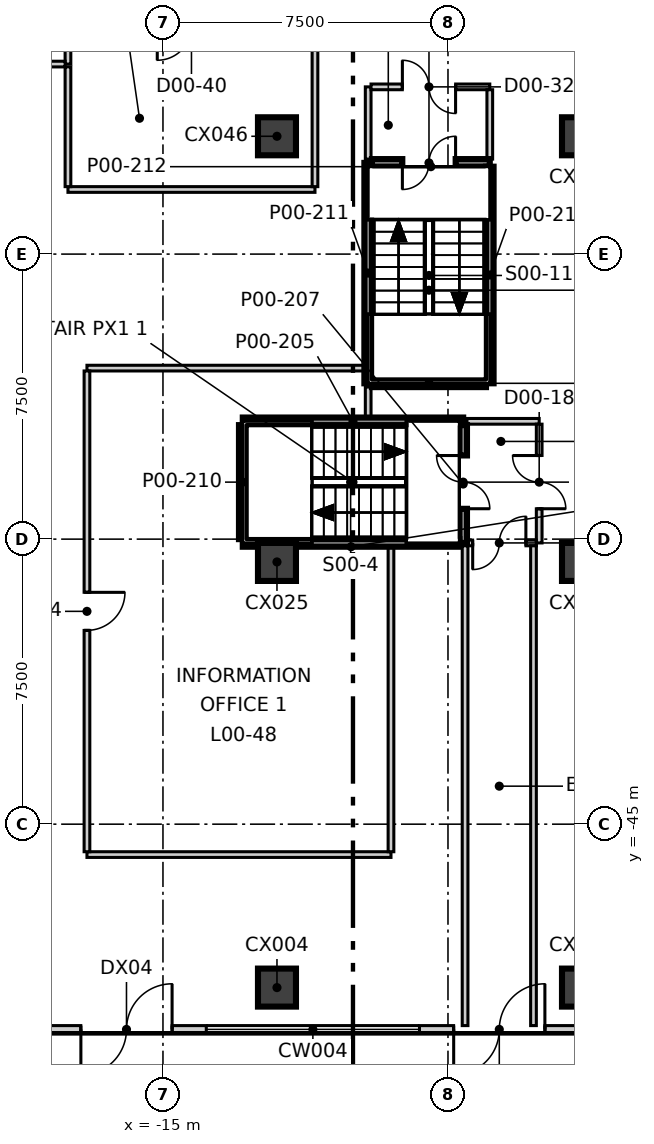
"""IFC4 building model, lengths in metres.
Left out: names, types, materials, properties, quantities, classifications, styles, units other than length and angle.
Written with IfcOpenShell. Run it as: python <this file> out.ifc"""

import sys

from ifc_helpers import new_model, si_unit, direction, frame, frame_2d, origin, origin_2d, place, context, subcontext, project, spatial, rectangle, extrude, element, fill, save


model = new_model("IFC4")
c1 = context("Model", 3, precision=1e-05, world=origin(), true_north=direction((0.0, 1.0)))
c2 = subcontext(c1, "Body", "Model", "MODEL_VIEW")
j1 = project(units=[si_unit("LENGTHUNIT", "METRE"), si_unit("PLANEANGLEUNIT", "RADIAN")], contexts=[c1])
p1 = place(None, origin())
s1 = spatial("IfcSite", under=j1, at=p1, CompositionType="ELEMENT")
p2 = place(p1, origin())
s2 = spatial("IfcBuilding", under=s1, at=p2, CompositionType="ELEMENT")
p3 = place(p2, origin())
s3 = spatial("IfcBuildingStorey", under=s2, at=p3, CompositionType="ELEMENT", Elevation=0.0)
for number, where, z_axis, x_axis in (
    (1, (-12.0, -49.3, -0.4), (0.0, 0.0, 1.0), (1.0, 0.0, 0.0)),
    (2, (-4.0, -49.3, -0.4), (0.0, 0.0, 1.0), (1.0, 0.0, 0.0)),
    (3, (-12.0, -38.1, -0.4), (0.0, 0.0, 1.0), (1.0, 0.0, 0.0)),
    (4, (-4.0, -38.1, -0.4), (0.0, 0.0, 1.0), (1.0, 0.0, 0.0)),
    (5, (-12.0, -26.9, -0.4), (0.0, 0.0, 1.0), (1.0, 0.0, 0.0)),
    (6, (-4.0, -26.9, -0.4), (0.0, 0.0, 1.0), (1.0, 0.0, 0.0)),
):
    element("IfcColumn", number, at=place(p3, frame(where, z_axis=z_axis, x_axis=x_axis)), inside=s3, PredefinedType="COLUMN", context=c2, shape_type="SweptSolid", body=[
        extrude(rectangle(XDim=1.0, YDim=1.0, at=origin_2d()), origin(), (0.0, 0.0, 1.0), 8.5),
    ])
p4 = place(p3, frame((-18.06, -50.4, 0.0), z_axis=(0.0, 0.0, 1.0), x_axis=(1.0, 0.0, 0.0)))
e7 = element("IfcWall", 7, at=p4, inside=s3, PredefinedType="ELEMENTEDWALL", context=c2, shape_type="SweptSolid", body=[
    extrude(rectangle(XDim=4.2, YDim=0.2, at=frame_2d((2.1, 0.0))), origin(), (0.0, 0.0, 1.0), 8.1),
])
p5 = place(p4, frame((0.9, 0.0, 0.0)))
e8 = element("IfcOpeningElement", 8, at=p5, cuts=e7, PredefinedType="OPENING", context=c2, shape_type="SweptSolid", body=[
    extrude(rectangle(XDim=2.4, YDim=3.2, at=frame_2d((1.2, 1.6))), frame((0.0, 0.11, 0.0), z_axis=(0.0, -1.0, 0.0), x_axis=(1.0, 0.0, 0.0)), (0.0, 0.0, 1.0), 0.22),
])
p6 = place(p3, frame((-8.25, -50.4, 0.0), z_axis=(0.0, 0.0, 1.0), x_axis=(1.0, 0.0, 0.0)))
e9 = element("IfcWall", 9, at=p6, inside=s3, PredefinedType="ELEMENTEDWALL", context=c2, shape_type="SweptSolid", body=[
    extrude(rectangle(XDim=4.2, YDim=0.2, at=frame_2d((2.1, 0.0))), origin(), (0.0, 0.0, 1.0), 8.1),
])
p7 = place(p6, frame((0.9, 0.0, 0.0)))
e10 = element("IfcOpeningElement", 10, at=p7, cuts=e9, PredefinedType="OPENING", context=c2, shape_type="SweptSolid", body=[
    extrude(rectangle(XDim=2.4, YDim=3.2, at=frame_2d((1.2, 1.6))), frame((0.0, 0.11, 0.0), z_axis=(0.0, -1.0, 0.0), x_axis=(1.0, 0.0, 0.0)), (0.0, 0.0, 1.0), 0.22),
])
p8 = place(p3, frame((-9.6, -27.5, 0.0), z_axis=(0.0, 0.0, 1.0), x_axis=(0.0, 1.0, 0.0)))
e11 = element("IfcWall", 11, at=p8, inside=s3, PredefinedType="PARTITIONING", context=c2, shape_type="SweptSolid", body=[
    extrude(rectangle(XDim=1.9, YDim=0.15, at=frame_2d((0.95, 0.0))), origin(), (0.0, 0.0, 1.0), 8.1),
])
p9 = place(p3, frame((-9.525, -25.6, 0.0), z_axis=(0.0, 0.0, 1.0), x_axis=(1.0, 0.0, 0.0)))
e12 = element("IfcWall", 12, at=p9, inside=s3, PredefinedType="PARTITIONING", context=c2, shape_type="SweptSolid", body=[
    extrude(rectangle(XDim=3.125, YDim=0.15, at=frame_2d((1.562, 0.0))), origin(), (0.0, 0.0, 1.0), 8.1),
])
p10 = place(p9, frame((0.825, 0.0, 0.0)))
e13 = element("IfcOpeningElement", 13, at=p10, cuts=e12, PredefinedType="OPENING", context=c2, shape_type="SweptSolid", body=[
    extrude(rectangle(XDim=1.4, YDim=2.1, at=frame_2d((0.7, 1.05))), frame((0.0, 0.085, 0.0), z_axis=(0.0, -1.0, 0.0), x_axis=(1.0, 0.0, 0.0)), (0.0, 0.0, 1.0), 0.17),
])
p11 = place(p3, frame((-6.4, -27.5, 0.0), z_axis=(0.0, 0.0, 1.0), x_axis=(0.0, 1.0, 0.0)))
e14 = element("IfcWall", 14, at=p11, inside=s3, PredefinedType="PARTITIONING", context=c2, shape_type="SweptSolid", body=[
    extrude(rectangle(XDim=1.825, YDim=0.15, at=frame_2d((0.913, 0.0))), origin(), (0.0, 0.0, 1.0), 8.1),
])
p12 = place(p3, frame((-7.0, -34.4, 0.0), z_axis=(0.0, 0.0, 1.0), x_axis=(1.0, 0.0, 0.0)))
e15 = element("IfcWall", 15, at=p12, inside=s3, PredefinedType="PARTITIONING", context=c2, shape_type="SweptSolid", body=[
    extrude(rectangle(XDim=1.9, YDim=0.15, at=frame_2d((0.95, 0.0))), origin(), (0.0, 0.0, 1.0), 8.1),
])
p13 = place(p3, frame((-5.1, -37.6, 0.0), z_axis=(0.0, 0.0, 1.0), x_axis=(0.0, 1.0, 0.0)))
e16 = element("IfcWall", 16, at=p13, inside=s3, PredefinedType="PARTITIONING", context=c2, shape_type="SweptSolid", body=[
    extrude(rectangle(XDim=3.125, YDim=0.15, at=frame_2d((1.562, 0.0))), origin(), (0.0, 0.0, 1.0), 8.1),
])
p14 = place(p13, frame((0.9, 0.0, 0.0)))
e17 = element("IfcOpeningElement", 17, at=p14, cuts=e16, PredefinedType="OPENING", context=c2, shape_type="SweptSolid", body=[
    extrude(rectangle(XDim=1.4, YDim=2.1, at=frame_2d((0.7, 1.05))), frame((0.0, 0.085, 0.0), z_axis=(0.0, -1.0, 0.0), x_axis=(1.0, 0.0, 0.0)), (0.0, 0.0, 1.0), 0.17),
])
p15 = place(p3, frame((-7.05, -37.6, 0.0), z_axis=(0.0, 0.0, 1.0), x_axis=(1.0, 0.0, 0.0)))
e18 = element("IfcWall", 18, at=p15, inside=s3, PredefinedType="PARTITIONING", context=c2, shape_type="SweptSolid", body=[
    extrude(rectangle(XDim=1.875, YDim=0.15, at=frame_2d((0.938, 0.0))), origin(), (0.0, 0.0, 1.0), 8.1),
])
p16 = place(p15, frame((0.2, 0.0, 0.0)))
e19 = element("IfcOpeningElement", 19, at=p16, cuts=e18, PredefinedType="OPENING", context=c2, shape_type="SweptSolid", body=[
    extrude(rectangle(XDim=1.4, YDim=2.1, at=frame_2d((0.7, 1.05))), frame((0.0, 0.085, 0.0), z_axis=(0.0, -1.0, 0.0), x_axis=(1.0, 0.0, 0.0)), (0.0, 0.0, 1.0), 0.17),
])
for number, where, z_axis, x_axis in (
    (20, (-7.05, -50.3, 0.0), (0.0, 0.0, 1.0), (0.0, 1.0, 0.0)),
    (21, (-5.25, -50.3, 0.0), (0.0, 0.0, 1.0), (0.0, 1.0, 0.0)),
):
    element("IfcWall", number, at=place(p3, frame(where, z_axis=z_axis, x_axis=x_axis)), inside=s3, PredefinedType="PARTITIONING", context=c2, shape_type="SweptSolid", body=[
        extrude(rectangle(XDim=12.625, YDim=0.15, at=frame_2d((6.312, 0.0))), origin(), (0.0, 0.0, 1.0), 8.1),
    ])
p17 = place(p3, frame((-17.5, -25.0, 0.0), z_axis=(0.0, 0.0, 1.0), x_axis=(0.0, 1.0, 0.0)))
e22 = element("IfcWall", 22, at=p17, inside=s3, PredefinedType="PARTITIONING", context=c2, shape_type="SweptSolid", body=[
    extrude(rectangle(XDim=4.925, YDim=0.15, at=frame_2d((2.462, 0.0))), origin(), (0.0, 0.0, 1.0), 8.1),
])
p18 = place(p3, frame((-20.425, -25.0, 0.0), z_axis=(0.0, 0.0, 1.0), x_axis=(1.0, 0.0, 0.0)))
e23 = element("IfcWall", 23, at=p18, inside=s3, PredefinedType="PARTITIONING", context=c2, shape_type="SweptSolid", body=[
    extrude(rectangle(XDim=2.85, YDim=0.15, at=frame_2d((1.425, 0.0))), origin(), (0.0, 0.0, 1.0), 8.1),
])
p19 = place(p18, frame((0.625, 0.0, 0.0)))
e24 = element("IfcOpeningElement", 24, at=p19, cuts=e23, PredefinedType="OPENING", context=c2, shape_type="SweptSolid", body=[
    extrude(rectangle(XDim=1.6, YDim=2.1, at=frame_2d((0.8, 1.05))), frame((0.0, 0.085, 0.0), z_axis=(0.0, -1.0, 0.0), x_axis=(1.0, 0.0, 0.0)), (0.0, 0.0, 1.0), 0.17),
])
p20 = place(p3, frame((-17.0, -33.0, 0.0), z_axis=(0.0, 0.0, 1.0), x_axis=(1.0, 0.0, 0.0)))
e25 = element("IfcWall", 25, at=p20, inside=s3, PredefinedType="PARTITIONING", context=c2, shape_type="SweptSolid", body=[
    extrude(rectangle(XDim=7.3, YDim=0.15, at=frame_2d((3.65, 0.0))), origin(), (0.0, 0.0, 1.0), 8.1),
])
p21 = place(p3, frame((-17.0, -45.8, 0.0), z_axis=(0.0, 0.0, 1.0), x_axis=(1.0, 0.0, 0.0)))
e26 = element("IfcWall", 26, at=p21, inside=s3, PredefinedType="PARTITIONING", context=c2, shape_type="SweptSolid", body=[
    extrude(rectangle(XDim=8.0, YDim=0.15, at=frame_2d((4.0, 0.0))), origin(), (0.0, 0.0, 1.0), 8.1),
])
p22 = place(p3, frame((-17.5, -28.3, 0.0), z_axis=(0.0, 0.0, 1.0), x_axis=(1.0, 0.0, 0.0)))
e27 = element("IfcWall", 27, at=p22, inside=s3, PredefinedType="PARTITIONING", context=c2, shape_type="SweptSolid", body=[
    extrude(rectangle(XDim=6.5, YDim=0.15, at=frame_2d((3.25, 0.0))), origin(), (0.0, 0.0, 1.0), 8.1),
])
p23 = place(p3, frame((-11.0, -28.225, 0.0), z_axis=(0.0, 0.0, 1.0), x_axis=(0.0, 1.0, 0.0)))
e28 = element("IfcWall", 28, at=p23, inside=s3, PredefinedType="PARTITIONING", context=c2, shape_type="SweptSolid", body=[
    extrude(rectangle(XDim=4.15, YDim=0.15, at=frame_2d((2.075, 0.0))), origin(), (0.0, 0.0, 1.0), 8.1),
])
p24 = place(p3, frame((-17.5, -28.225, 0.0), z_axis=(0.0, 0.0, 1.0), x_axis=(0.0, 1.0, 0.0)))
e29 = element("IfcWall", 29, at=p24, inside=s3, PredefinedType="PARTITIONING", context=c2, shape_type="SweptSolid", body=[
    extrude(rectangle(XDim=3.152, YDim=0.15, at=frame_2d((1.576, 0.0))), origin(), (0.0, 0.0, 1.0), 8.1),
])
p25 = place(p3, frame((-9.6, -34.3, 0.0), z_axis=(0.0, 0.0, 1.0), x_axis=(0.0, 1.0, 0.0)))
e30 = element("IfcWall", 30, at=p25, inside=s3, PredefinedType="PARTITIONING", context=c2, shape_type="SweptSolid", body=[
    extrude(rectangle(XDim=0.802, YDim=0.15, at=frame_2d((0.401, 0.0))), origin(), (0.0, 0.0, 1.0), 8.1),
])
p26 = place(p3, frame((-9.0, -45.725, 0.0), z_axis=(0.0, 0.0, 1.0), x_axis=(0.0, 1.0, 0.0)))
e31 = element("IfcWall", 31, at=p26, inside=s3, PredefinedType="PARTITIONING", context=c2, shape_type="SweptSolid", body=[
    extrude(rectangle(XDim=8.025, YDim=0.15, at=frame_2d((4.013, 0.0))), origin(), (0.0, 0.0, 1.0), 8.1),
])
p27 = place(p3, frame((-17.0, -45.725, 0.0), z_axis=(0.0, 0.0, 1.0), x_axis=(0.0, 1.0, 0.0)))
e32 = element("IfcWall", 32, at=p27, inside=s3, PredefinedType="PARTITIONING", context=c2, shape_type="SweptSolid", body=[
    extrude(rectangle(XDim=12.65, YDim=0.15, at=frame_2d((6.325, 0.0))), origin(), (0.0, 0.0, 1.0), 8.1),
])
p28 = place(p27, frame((5.825, 0.0, 0.0)))
e33 = element("IfcOpeningElement", 33, at=p28, cuts=e32, PredefinedType="OPENING", context=c2, shape_type="SweptSolid", body=[
    extrude(rectangle(XDim=1.0, YDim=2.1, at=frame_2d((0.5, 1.05))), frame((0.0, 0.085, 0.0), z_axis=(0.0, -1.0, 0.0), x_axis=(1.0, 0.0, 0.0)), (0.0, 0.0, 1.0), 0.17),
])
p29 = place(p3, frame((-12.9, -34.4, 0.0), z_axis=(0.0, 0.0, 1.0), x_axis=(1.0, 0.0, 0.0)))
e34 = element("IfcWall", 34, at=p29, inside=s3, PredefinedType="SOLIDWALL", context=c2, shape_type="SweptSolid", body=[
    extrude(rectangle(XDim=5.8, YDim=0.2, at=frame_2d((2.9, 0.0))), origin(), (0.0, 0.0, 1.0), 8.1),
])
p30 = place(p3, frame((-7.1, -37.6, 0.0), z_axis=(0.0, 0.0, 1.0), x_axis=(0.0, 1.0, 0.0)))
e35 = element("IfcWall", 35, at=p30, inside=s3, PredefinedType="SOLIDWALL", context=c2, shape_type="SweptSolid", body=[
    extrude(rectangle(XDim=3.1, YDim=0.2, at=frame_2d((1.55, 0.0))), origin(), (0.0, 0.0, 1.0), 8.1),
])
p31 = place(p30, frame((0.9, 0.0, 0.0)))
e36 = element("IfcOpeningElement", 36, at=p31, cuts=e35, PredefinedType="OPENING", context=c2, shape_type="SweptSolid", body=[
    extrude(rectangle(XDim=1.4, YDim=2.1, at=frame_2d((0.7, 1.05))), frame((0.0, 0.11, 0.0), z_axis=(0.0, -1.0, 0.0), x_axis=(1.0, 0.0, 0.0)), (0.0, 0.0, 1.0), 0.22),
])
p32 = place(p3, frame((-12.9, -37.6, 0.0), z_axis=(0.0, 0.0, 1.0), x_axis=(1.0, 0.0, 0.0)))
e37 = element("IfcWall", 37, at=p32, inside=s3, PredefinedType="SOLIDWALL", context=c2, shape_type="SweptSolid", body=[
    extrude(rectangle(XDim=5.7, YDim=0.2, at=frame_2d((2.85, 0.0))), origin(), (0.0, 0.0, 1.0), 8.1),
])
p33 = place(p3, frame((-12.9, -37.5, 0.0), z_axis=(0.0, 0.0, 1.0), x_axis=(0.0, 1.0, 0.0)))
e38 = element("IfcWall", 38, at=p33, inside=s3, PredefinedType="SOLIDWALL", context=c2, shape_type="SweptSolid", body=[
    extrude(rectangle(XDim=3.0, YDim=0.2, at=frame_2d((1.5, 0.0))), origin(), (0.0, 0.0, 1.0), 8.1),
])
p34 = place(p3, frame((-9.6, -33.4, 0.0), z_axis=(0.0, 0.0, 1.0), x_axis=(0.0, 1.0, 0.0)))
e39 = element("IfcWall", 39, at=p34, inside=s3, PredefinedType="SOLIDWALL", context=c2, shape_type="SweptSolid", body=[
    extrude(rectangle(XDim=5.8, YDim=0.2, at=frame_2d((2.9, 0.0))), origin(), (0.0, 0.0, 1.0), 8.1),
])
p35 = place(p3, frame((-9.5, -27.6, 0.0), z_axis=(0.0, 0.0, 1.0), x_axis=(1.0, 0.0, 0.0)))
e40 = element("IfcWall", 40, at=p35, inside=s3, PredefinedType="SOLIDWALL", context=c2, shape_type="SweptSolid", body=[
    extrude(rectangle(XDim=3.1, YDim=0.2, at=frame_2d((1.55, 0.0))), origin(), (0.0, 0.0, 1.0), 8.1),
])
p36 = place(p35, frame((0.8, 0.0, 0.0)))
e41 = element("IfcOpeningElement", 41, at=p36, cuts=e40, PredefinedType="OPENING", context=c2, shape_type="SweptSolid", body=[
    extrude(rectangle(XDim=1.4, YDim=2.1, at=frame_2d((0.7, 1.05))), frame((0.0, 0.11, 0.0), z_axis=(0.0, -1.0, 0.0), x_axis=(1.0, 0.0, 0.0)), (0.0, 0.0, 1.0), 0.22),
])
p37 = place(p3, frame((-6.4, -33.4, 0.0), z_axis=(0.0, 0.0, 1.0), x_axis=(0.0, 1.0, 0.0)))
e42 = element("IfcWall", 42, at=p37, inside=s3, PredefinedType="SOLIDWALL", context=c2, shape_type="SweptSolid", body=[
    extrude(rectangle(XDim=5.7, YDim=0.2, at=frame_2d((2.85, 0.0))), origin(), (0.0, 0.0, 1.0), 8.1),
])
p38 = place(p3, frame((-9.5, -33.4, 0.0), z_axis=(0.0, 0.0, 1.0), x_axis=(1.0, 0.0, 0.0)))
e43 = element("IfcWall", 43, at=p38, inside=s3, PredefinedType="SOLIDWALL", context=c2, shape_type="SweptSolid", body=[
    extrude(rectangle(XDim=3.0, YDim=0.2, at=frame_2d((1.5, 0.0))), origin(), (0.0, 0.0, 1.0), 8.1),
])
p39 = place(p5, frame((2.4, 0.0, 0.0), z_axis=(0.0, 0.0, 1.0), x_axis=(-1.0, 0.0, 0.0)))
e44 = element("IfcDoor", 44, at=p39, inside=s3, OperationType="DOUBLE_DOOR_SINGLE_SWING", PredefinedType="DOOR", context=c2, shape_type="SweptSolid", body=[
    extrude(rectangle(XDim=2.4, YDim=3.2, at=frame_2d((1.2, 1.6))), frame((0.0, 0.025, 0.0), z_axis=(0.0, -1.0, 0.0), x_axis=(1.0, 0.0, 0.0)), (0.0, 0.0, 1.0), 0.05),
])
fill(e8, e44)
p40 = place(p7, frame((2.4, 0.0, 0.0), z_axis=(0.0, 0.0, 1.0), x_axis=(-1.0, 0.0, 0.0)))
e45 = element("IfcDoor", 45, at=p40, inside=s3, OperationType="DOUBLE_DOOR_SINGLE_SWING", PredefinedType="DOOR", context=c2, shape_type="SweptSolid", body=[
    extrude(rectangle(XDim=2.4, YDim=3.2, at=frame_2d((1.2, 1.6))), frame((0.0, 0.025, 0.0), z_axis=(0.0, -1.0, 0.0), x_axis=(1.0, 0.0, 0.0)), (0.0, 0.0, 1.0), 0.05),
])
fill(e10, e45)
p41 = place(p31, origin())
e46 = element("IfcDoor", 46, at=p41, inside=s3, OperationType="DOUBLE_DOOR_SINGLE_SWING", PredefinedType="DOOR", context=c2, shape_type="SweptSolid", body=[
    extrude(rectangle(XDim=1.4, YDim=2.1, at=frame_2d((0.7, 1.05))), frame((0.0, 0.025, 0.0), z_axis=(0.0, -1.0, 0.0), x_axis=(1.0, 0.0, 0.0)), (0.0, 0.0, 1.0), 0.05),
])
fill(e36, e46)
p42 = place(p14, origin())
e47 = element("IfcDoor", 47, at=p42, inside=s3, OperationType="DOUBLE_DOOR_SINGLE_SWING", PredefinedType="DOOR", context=c2, shape_type="SweptSolid", body=[
    extrude(rectangle(XDim=1.4, YDim=2.1, at=frame_2d((0.7, 1.05))), frame((0.0, 0.025, 0.0), z_axis=(0.0, -1.0, 0.0), x_axis=(1.0, 0.0, 0.0)), (0.0, 0.0, 1.0), 0.05),
])
fill(e17, e47)
p43 = place(p36, origin())
e48 = element("IfcDoor", 48, at=p43, inside=s3, OperationType="DOUBLE_DOOR_SINGLE_SWING", PredefinedType="DOOR", context=c2, shape_type="SweptSolid", body=[
    extrude(rectangle(XDim=1.4, YDim=2.1, at=frame_2d((0.7, 1.05))), frame((0.0, 0.025, 0.0), z_axis=(0.0, -1.0, 0.0), x_axis=(1.0, 0.0, 0.0)), (0.0, 0.0, 1.0), 0.05),
])
fill(e41, e48)
p44 = place(p10, origin())
e49 = element("IfcDoor", 49, at=p44, inside=s3, OperationType="DOUBLE_DOOR_SINGLE_SWING", PredefinedType="DOOR", context=c2, shape_type="SweptSolid", body=[
    extrude(rectangle(XDim=1.4, YDim=2.1, at=frame_2d((0.7, 1.05))), frame((0.0, 0.025, 0.0), z_axis=(0.0, -1.0, 0.0), x_axis=(1.0, 0.0, 0.0)), (0.0, 0.0, 1.0), 0.05),
])
fill(e13, e49)
p45 = place(p28, origin())
e50 = element("IfcDoor", 50, at=p45, inside=s3, OperationType="SINGLE_SWING_RIGHT", PredefinedType="DOOR", context=c2, shape_type="SweptSolid", body=[
    extrude(rectangle(XDim=1.0, YDim=2.1, at=frame_2d((0.5, 1.05))), frame((0.0, 0.025, 0.0), z_axis=(0.0, -1.0, 0.0), x_axis=(1.0, 0.0, 0.0)), (0.0, 0.0, 1.0), 0.05),
])
fill(e33, e50)
p46 = place(p16, origin())
e51 = element("IfcDoor", 51, at=p46, inside=s3, OperationType="DOUBLE_DOOR_SINGLE_SWING", PredefinedType="DOOR", context=c2, shape_type="SweptSolid", body=[
    extrude(rectangle(XDim=1.4, YDim=2.1, at=frame_2d((0.7, 1.05))), frame((0.0, 0.025, 0.0), z_axis=(0.0, -1.0, 0.0), x_axis=(1.0, 0.0, 0.0)), (0.0, 0.0, 1.0), 0.05),
])
fill(e19, e51)
save(model, sys.argv[1])
